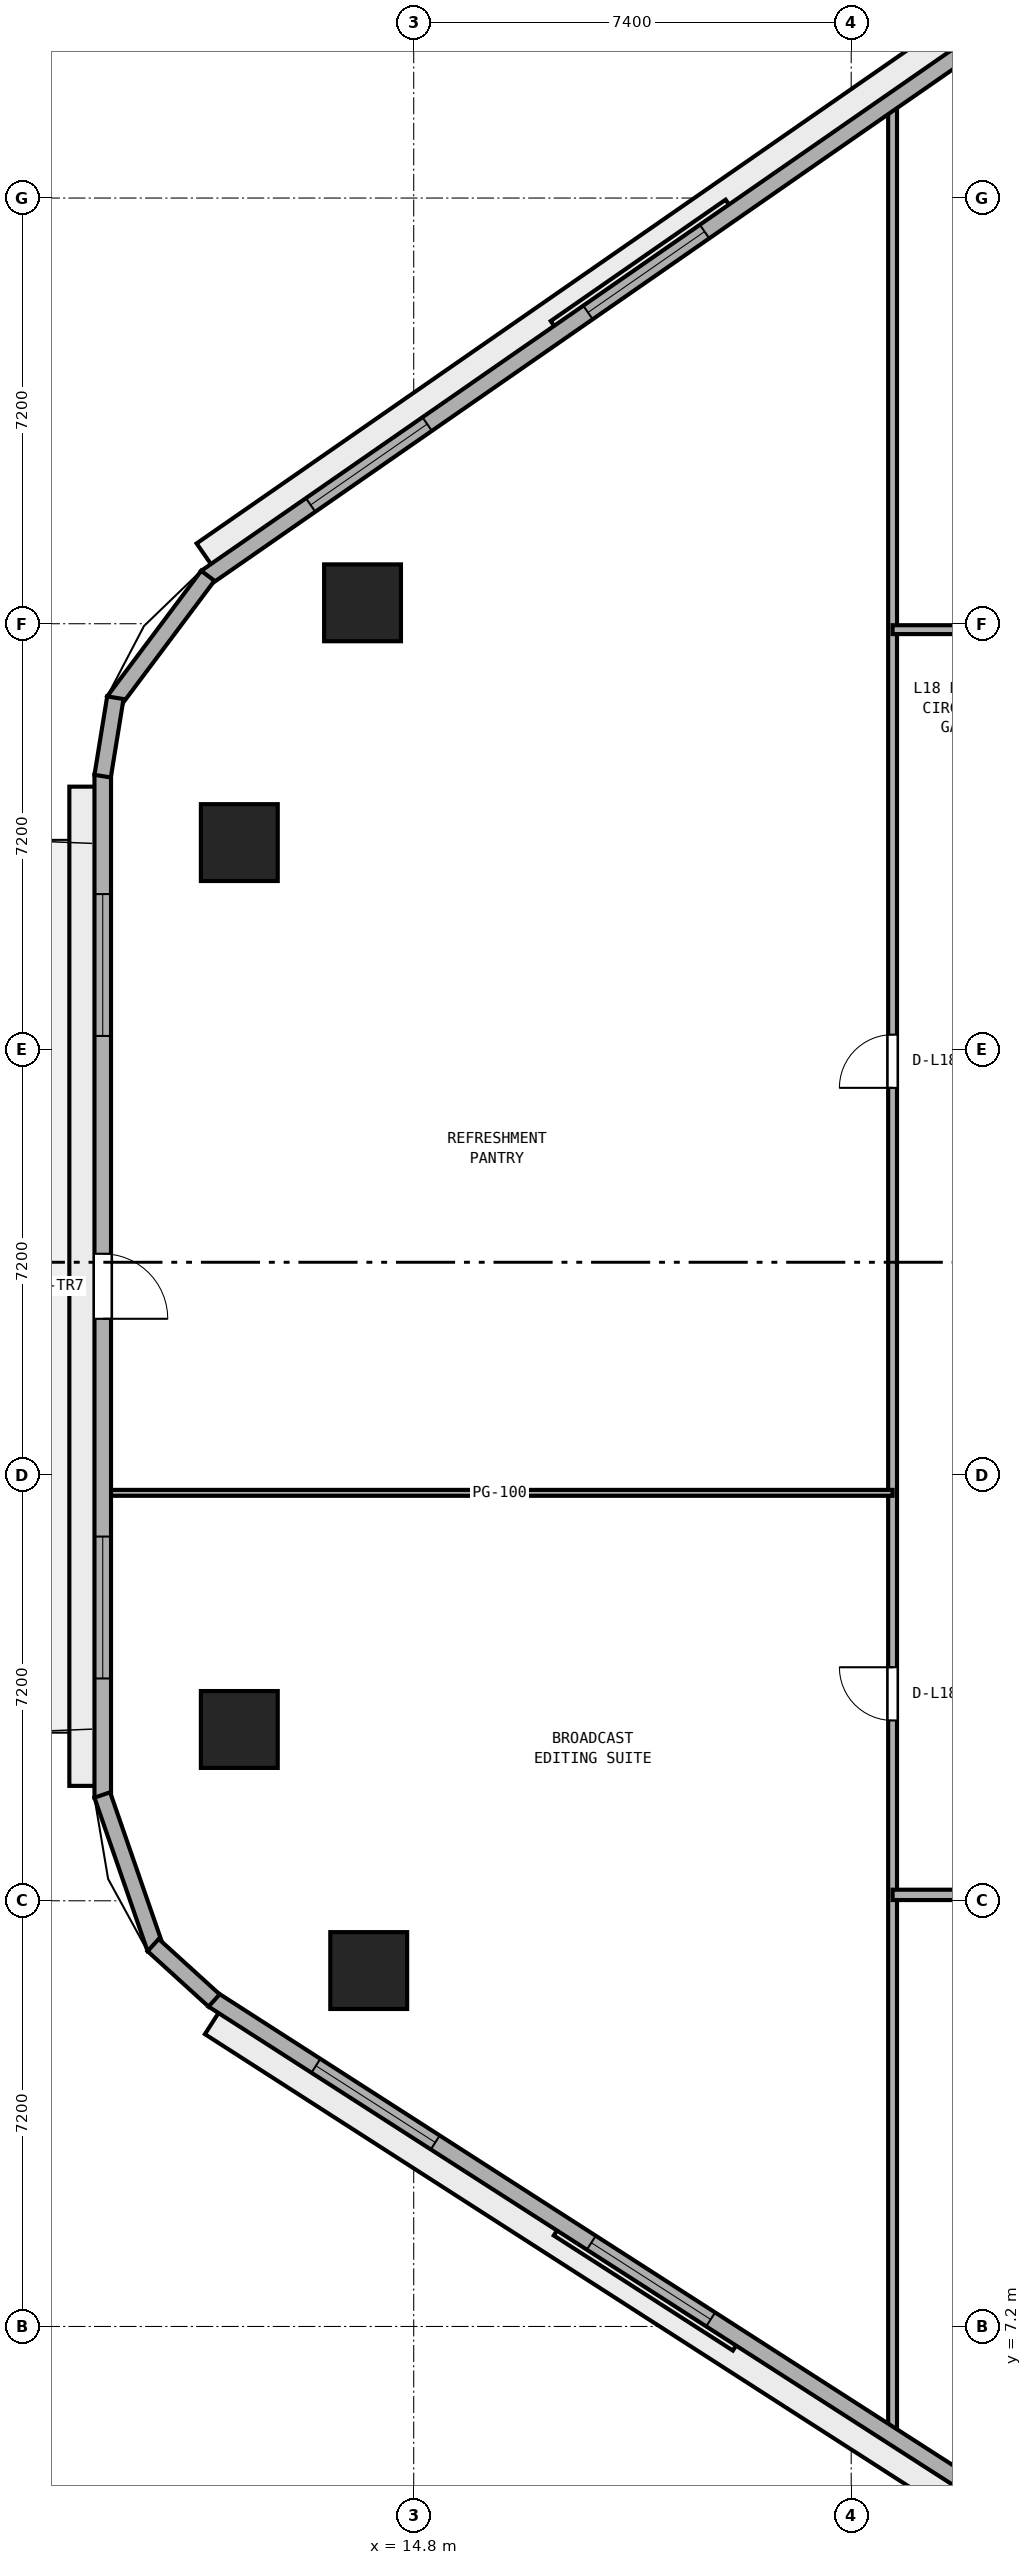
"""IFC4 building model, lengths in metres.
Left out: names, types, materials, properties, quantities, classifications, styles, units other than length and angle.
Written with IfcOpenShell. Run it as: python <this file> out.ifc"""

import sys

from ifc_helpers import new_model, si_unit, direction, frame, frame_2d, origin, origin_2d, place, context, subcontext, project, spatial, rectangle, extrude, element, fill, save


model = new_model("IFC4")
c1 = context("Model", 3, precision=1e-05, world=origin(), true_north=direction((0.0, 1.0)))
c2 = subcontext(c1, "Body", "Model", "MODEL_VIEW")
j1 = project(units=[si_unit("LENGTHUNIT", "METRE"), si_unit("PLANEANGLEUNIT", "RADIAN")], contexts=[c1])
p1 = place(None, origin())
s1 = spatial("IfcSite", under=j1, at=p1, CompositionType="ELEMENT")
p2 = place(p1, origin())
s2 = spatial("IfcBuilding", under=s1, at=p2, CompositionType="ELEMENT")
p3 = place(p2, frame((0.0, 0.0, 74.4)))
s3 = spatial("IfcBuildingStorey", under=s2, at=p3, CompositionType="ELEMENT", Elevation=74.4)
for number, where, z_axis, x_axis in (
    (1, (13.934, 36.354, 0.0), (0.0, 0.0, 1.0), (1.0, 0.0, 0.0)),
    (2, (11.85, 32.298, 0.0), (0.0, 0.0, 1.0), (1.0, 0.0, 0.0)),
    (3, (11.85, 17.298, 0.0), (0.0, 0.0, 1.0), (1.0, 0.0, 0.0)),
    (4, (14.039, 13.22, 0.0), (0.0, 0.0, 1.0), (1.0, 0.0, 0.0)),
):
    element("IfcColumn", number, at=place(p3, frame(where, z_axis=z_axis, x_axis=x_axis)), inside=s3, PredefinedType="COLUMN", context=c2, shape_type="SweptSolid", body=[
        extrude(rectangle(XDim=1.3, YDim=1.3, at=origin_2d()), origin(), (0.0, 0.0, 1.0), 3.8),
    ])
p4 = place(p3, frame((22.9, 5.316, 0.0), z_axis=(0.0, 0.0, 1.0), x_axis=(0.0, 1.0, 0.0)))
e5 = element("IfcWall", 5, at=p4, inside=s3, PredefinedType="PARTITIONING", context=c2, shape_type="SweptSolid", body=[
    extrude(rectangle(XDim=39.555, YDim=0.15, at=frame_2d((19.777, 0.0))), origin(), (0.0, 0.0, 1.0), 3.525),
])
p5 = place(p4, frame((12.135, 0.0, 0.0)))
e6 = element("IfcOpeningElement", 6, at=p5, cuts=e5, PredefinedType="OPENING", context=c2, shape_type="SweptSolid", body=[
    extrude(rectangle(XDim=0.9, YDim=2.1, at=frame_2d((0.45, 1.05))), frame((0.0, 0.085, 0.0), z_axis=(0.0, -1.0, 0.0), x_axis=(1.0, 0.0, 0.0)), (0.0, 0.0, 1.0), 0.17),
])
p6 = place(p4, frame((22.834, 0.0, 0.0)))
e7 = element("IfcOpeningElement", 7, at=p6, cuts=e5, PredefinedType="OPENING", context=c2, shape_type="SweptSolid", body=[
    extrude(rectangle(XDim=0.9, YDim=2.1, at=frame_2d((0.45, 1.05))), frame((0.0, 0.085, 0.0), z_axis=(0.0, -1.0, 0.0), x_axis=(1.0, 0.0, 0.0)), (0.0, 0.0, 1.0), 0.17),
])
p7 = place(p3, frame((22.9, 14.5, 0.0), z_axis=(0.0, 0.0, 1.0), x_axis=(1.0, 0.0, 0.0)))
e8 = element("IfcWall", 8, at=p7, inside=s3, PredefinedType="PARTITIONING", context=c2, shape_type="SweptSolid", body=[
    extrude(rectangle(XDim=28.2, YDim=0.175, at=frame_2d((14.1, 0.0))), origin(), (0.0, 0.0, 1.0), 3.525),
])
p8 = place(p7, frame((10.07, 0.0, 0.0)))
e9 = element("IfcOpeningElement", 9, at=p8, cuts=e8, PredefinedType="OPENING", context=c2, shape_type="SweptSolid", body=[
    extrude(rectangle(XDim=0.9, YDim=2.1, at=frame_2d((0.45, 1.05))), frame((0.0, 0.097, 0.0), z_axis=(0.0, -1.0, 0.0), x_axis=(1.0, 0.0, 0.0)), (0.0, 0.0, 1.0), 0.195),
])
p9 = place(p7, frame((23.93, 0.0, 0.0)))
e10 = element("IfcOpeningElement", 10, at=p9, cuts=e8, PredefinedType="OPENING", context=c2, shape_type="SweptSolid", body=[
    extrude(rectangle(XDim=0.9, YDim=2.1, at=frame_2d((0.45, 1.05))), frame((0.0, 0.097, 0.0), z_axis=(0.0, -1.0, 0.0), x_axis=(1.0, 0.0, 0.0)), (0.0, 0.0, 1.0), 0.195),
])
p10 = place(p3, frame((9.605, 21.3, 0.0), z_axis=(0.0, 0.0, 1.0), x_axis=(1.0, 0.0, 0.0)))
e11 = element("IfcWall", 11, at=p10, inside=s3, PredefinedType="PARTITIONING", context=c2, shape_type="SweptSolid", body=[
    extrude(rectangle(XDim=13.295, YDim=0.1, at=frame_2d((6.647, 0.0))), origin(), (0.0, 0.0, 1.0), 3.525),
])
p11 = place(p3, frame((22.9, 35.9, 0.0), z_axis=(0.0, 0.0, 1.0), x_axis=(1.0, 0.0, 0.0)))
e12 = element("IfcWall", 12, at=p11, inside=s3, PredefinedType="PARTITIONING", context=c2, shape_type="SweptSolid", body=[
    extrude(rectangle(XDim=28.2, YDim=0.15, at=frame_2d((14.1, 0.0))), origin(), (0.0, 0.0, 1.0), 3.525),
])
p12 = place(p11, frame((13.6, 0.0, 0.0)))
e13 = element("IfcOpeningElement", 13, at=p12, cuts=e12, PredefinedType="OPENING", context=c2, shape_type="SweptSolid", body=[
    extrude(rectangle(XDim=1.0, YDim=2.12, at=frame_2d((0.5, 1.06))), frame((0.0, 0.085, 0.0), z_axis=(0.0, -1.0, 0.0), x_axis=(1.0, 0.0, 0.0)), (0.0, 0.0, 1.0), 0.17),
])
p13 = place(p3, frame((26.182, 47.118, 0.0), z_axis=(0.0, 0.0, 1.0), x_axis=(-0.821547956627, -0.570139417127, 0.0)))
e14 = element("IfcWall", 14, at=p13, inside=s3, PredefinedType="STANDARD", context=c2, shape_type="SweptSolid", body=[
    extrude(rectangle(XDim=18.132, YDim=0.28, at=frame_2d((9.066, 0.0))), origin(), (0.0, 0.0, 1.0), 3.525),
])
p14 = place(p13, frame((7.866, 0.0, 0.9)))
e15 = element("IfcOpeningElement", 15, at=p14, cuts=e14, PredefinedType="OPENING", context=c2, shape_type="SweptSolid", body=[
    extrude(rectangle(XDim=2.4, YDim=1.75, at=frame_2d((1.2, 0.875))), frame((0.0, 0.15, 0.0), z_axis=(0.0, -1.0, 0.0), x_axis=(1.0, 0.0, 0.0)), (0.0, 0.0, 1.0), 0.3),
])
p15 = place(p13, frame((13.577, 0.0, 0.9)))
e16 = element("IfcOpeningElement", 16, at=p15, cuts=e14, PredefinedType="OPENING", context=c2, shape_type="SweptSolid", body=[
    extrude(rectangle(XDim=2.4, YDim=1.75, at=frame_2d((1.2, 0.875))), frame((0.0, 0.15, 0.0), z_axis=(0.0, -1.0, 0.0), x_axis=(1.0, 0.0, 0.0)), (0.0, 0.0, 1.0), 0.3),
])
p16 = place(p3, frame((9.54, 33.444, 0.0), z_axis=(0.0, 0.0, 1.0), x_axis=(0.0, -1.0, 0.0)))
e17 = element("IfcWall", 17, at=p16, inside=s3, PredefinedType="STANDARD", context=c2, shape_type="SweptSolid", body=[
    extrude(rectangle(XDim=17.301, YDim=0.28, at=frame_2d((8.65, 0.0))), origin(), (0.0, 0.0, 1.0), 3.525),
])
p17 = place(p16, frame((8.1, 0.0, 0.0)))
e18 = element("IfcOpeningElement", 18, at=p17, cuts=e17, PredefinedType="OPENING", context=c2, shape_type="SweptSolid", body=[
    extrude(rectangle(XDim=1.1, YDim=2.2, at=frame_2d((0.55, 1.1))), frame((0.0, 0.15, 0.0), z_axis=(0.0, -1.0, 0.0), x_axis=(1.0, 0.0, 0.0)), (0.0, 0.0, 1.0), 0.3),
])
p18 = place(p16, frame((2.017, 0.0, 0.9)))
e19 = element("IfcOpeningElement", 19, at=p18, cuts=e17, PredefinedType="OPENING", context=c2, shape_type="SweptSolid", body=[
    extrude(rectangle(XDim=2.4, YDim=1.75, at=frame_2d((1.2, 0.875))), frame((0.0, 0.15, 0.0), z_axis=(0.0, -1.0, 0.0), x_axis=(1.0, 0.0, 0.0)), (0.0, 0.0, 1.0), 0.3),
])
p19 = place(p16, frame((12.884, 0.0, 0.9)))
e20 = element("IfcOpeningElement", 20, at=p19, cuts=e17, PredefinedType="OPENING", context=c2, shape_type="SweptSolid", body=[
    extrude(rectangle(XDim=2.4, YDim=1.75, at=frame_2d((1.2, 0.875))), frame((0.0, 0.15, 0.0), z_axis=(0.0, -1.0, 0.0), x_axis=(1.0, 0.0, 0.0)), (0.0, 0.0, 1.0), 0.3),
])
p20 = place(p3, frame((11.405, 12.728, 0.0), z_axis=(0.0, 0.0, 1.0), x_axis=(0.841304564637, -0.540561402175, 0.0)))
e21 = element("IfcWall", 21, at=p20, inside=s3, PredefinedType="STANDARD", context=c2, shape_type="SweptSolid", body=[
    extrude(rectangle(XDim=17.612, YDim=0.28, at=frame_2d((8.806, 0.0))), origin(), (0.0, 0.0, 1.0), 3.525),
])
p21 = place(p20, frame((2.069, 0.0, 0.9)))
e22 = element("IfcOpeningElement", 22, at=p21, cuts=e21, PredefinedType="OPENING", context=c2, shape_type="SweptSolid", body=[
    extrude(rectangle(XDim=2.4, YDim=1.75, at=frame_2d((1.2, 0.875))), frame((0.0, 0.15, 0.0), z_axis=(0.0, -1.0, 0.0), x_axis=(1.0, 0.0, 0.0)), (0.0, 0.0, 1.0), 0.3),
])
p22 = place(p20, frame((7.606, 0.0, 0.9)))
e23 = element("IfcOpeningElement", 23, at=p22, cuts=e21, PredefinedType="OPENING", context=c2, shape_type="SweptSolid", body=[
    extrude(rectangle(XDim=2.4, YDim=1.75, at=frame_2d((1.2, 0.875))), frame((0.0, 0.15, 0.0), z_axis=(0.0, -1.0, 0.0), x_axis=(1.0, 0.0, 0.0)), (0.0, 0.0, 1.0), 0.3),
])
p23 = place(p3, frame((11.318, 36.811, 0.0), z_axis=(0.0, 0.0, 1.0), x_axis=(-0.599455152629, -0.800408345775, 0.0)))
e24 = element("IfcWall", 24, at=p23, inside=s3, PredefinedType="STANDARD", context=c2, shape_type="SweptSolid", body=[
    extrude(rectangle(XDim=2.653, YDim=0.28, at=frame_2d((1.327, 0.0))), origin(), (0.0, 0.0, 1.0), 3.525),
])
p24 = place(p3, frame((9.753, 34.749, 0.0), z_axis=(0.0, 0.0, 1.0), x_axis=(-0.160037671962, -0.987110907423, 0.0)))
e25 = element("IfcWall", 25, at=p24, inside=s3, PredefinedType="STANDARD", context=c2, shape_type="SweptSolid", body=[
    extrude(rectangle(XDim=1.344, YDim=0.28, at=frame_2d((0.672, 0.0))), origin(), (0.0, 0.0, 1.0), 3.525),
])
p25 = place(p3, frame((9.532, 16.189, 0.0), z_axis=(0.0, 0.0, 1.0), x_axis=(0.32708309668, -0.944995580871, 0.0)))
e26 = element("IfcWall", 26, at=p25, inside=s3, PredefinedType="STANDARD", context=c2, shape_type="SweptSolid", body=[
    extrude(rectangle(XDim=2.748, YDim=0.28, at=frame_2d((1.374, 0.0))), origin(), (0.0, 0.0, 1.0), 3.525),
])
p26 = place(p3, frame((10.393, 13.651, 0.0), z_axis=(0.0, 0.0, 1.0), x_axis=(0.74003521851, -0.672568119498, 0.0)))
e27 = element("IfcWall", 27, at=p26, inside=s3, PredefinedType="STANDARD", context=c2, shape_type="SweptSolid", body=[
    extrude(rectangle(XDim=1.393, YDim=0.28, at=frame_2d((0.697, 0.0))), origin(), (0.0, 0.0, 1.0), 3.525),
])
p27 = place(p5, origin())
e28 = element("IfcDoor", 28, at=p27, inside=s3, OperationType="SINGLE_SWING_RIGHT", PredefinedType="DOOR", context=c2, shape_type="SweptSolid", body=[
    extrude(rectangle(XDim=0.9, YDim=2.1, at=frame_2d((0.45, 1.05))), frame((0.0, 0.025, 0.0), z_axis=(0.0, -1.0, 0.0), x_axis=(1.0, 0.0, 0.0)), (0.0, 0.0, 1.0), 0.05),
])
fill(e6, e28)
p28 = place(p6, origin())
e29 = element("IfcDoor", 29, at=p28, inside=s3, OperationType="SINGLE_SWING_LEFT", PredefinedType="DOOR", context=c2, shape_type="SweptSolid", body=[
    extrude(rectangle(XDim=0.9, YDim=2.1, at=frame_2d((0.45, 1.05))), frame((0.0, 0.025, 0.0), z_axis=(0.0, -1.0, 0.0), x_axis=(1.0, 0.0, 0.0)), (0.0, 0.0, 1.0), 0.05),
])
fill(e7, e29)
p29 = place(p14, origin())
e30 = element("IfcWindow", 30, at=p29, inside=s3, PartitioningType="SINGLE_PANEL", PredefinedType="WINDOW", context=c2, shape_type="SweptSolid", body=[
    extrude(rectangle(XDim=2.4, YDim=1.75, at=frame_2d((1.2, 0.875))), frame((0.0, 0.03, 0.0), z_axis=(0.0, -1.0, 0.0), x_axis=(1.0, 0.0, 0.0)), (0.0, 0.0, 1.0), 0.06),
])
fill(e15, e30)
p30 = place(p15, origin())
e31 = element("IfcWindow", 31, at=p30, inside=s3, PartitioningType="SINGLE_PANEL", PredefinedType="WINDOW", context=c2, shape_type="SweptSolid", body=[
    extrude(rectangle(XDim=2.4, YDim=1.75, at=frame_2d((1.2, 0.875))), frame((0.0, 0.03, 0.0), z_axis=(0.0, -1.0, 0.0), x_axis=(1.0, 0.0, 0.0)), (0.0, 0.0, 1.0), 0.06),
])
fill(e16, e31)
p31 = place(p17, origin())
e32 = element("IfcDoor", 32, at=p31, inside=s3, OperationType="SINGLE_SWING_RIGHT", PredefinedType="DOOR", context=c2, shape_type="SweptSolid", body=[
    extrude(rectangle(XDim=1.1, YDim=2.2, at=frame_2d((0.55, 1.1))), frame((0.0, 0.025, 0.0), z_axis=(0.0, -1.0, 0.0), x_axis=(1.0, 0.0, 0.0)), (0.0, 0.0, 1.0), 0.05),
])
fill(e18, e32)
p32 = place(p18, origin())
e33 = element("IfcWindow", 33, at=p32, inside=s3, PartitioningType="SINGLE_PANEL", PredefinedType="WINDOW", context=c2, shape_type="SweptSolid", body=[
    extrude(rectangle(XDim=2.4, YDim=1.75, at=frame_2d((1.2, 0.875))), frame((0.0, 0.03, 0.0), z_axis=(0.0, -1.0, 0.0), x_axis=(1.0, 0.0, 0.0)), (0.0, 0.0, 1.0), 0.06),
])
fill(e19, e33)
p33 = place(p19, origin())
e34 = element("IfcWindow", 34, at=p33, inside=s3, PartitioningType="SINGLE_PANEL", PredefinedType="WINDOW", context=c2, shape_type="SweptSolid", body=[
    extrude(rectangle(XDim=2.4, YDim=1.75, at=frame_2d((1.2, 0.875))), frame((0.0, 0.03, 0.0), z_axis=(0.0, -1.0, 0.0), x_axis=(1.0, 0.0, 0.0)), (0.0, 0.0, 1.0), 0.06),
])
fill(e20, e34)
p34 = place(p21, origin())
e35 = element("IfcWindow", 35, at=p34, inside=s3, PartitioningType="SINGLE_PANEL", PredefinedType="WINDOW", context=c2, shape_type="SweptSolid", body=[
    extrude(rectangle(XDim=2.4, YDim=1.75, at=frame_2d((1.2, 0.875))), frame((0.0, 0.03, 0.0), z_axis=(0.0, -1.0, 0.0), x_axis=(1.0, 0.0, 0.0)), (0.0, 0.0, 1.0), 0.06),
])
fill(e22, e35)
p35 = place(p22, origin())
e36 = element("IfcWindow", 36, at=p35, inside=s3, PartitioningType="SINGLE_PANEL", PredefinedType="WINDOW", context=c2, shape_type="SweptSolid", body=[
    extrude(rectangle(XDim=2.4, YDim=1.75, at=frame_2d((1.2, 0.875))), frame((0.0, 0.03, 0.0), z_axis=(0.0, -1.0, 0.0), x_axis=(1.0, 0.0, 0.0)), (0.0, 0.0, 1.0), 0.06),
])
fill(e23, e36)
save(model, sys.argv[1])
